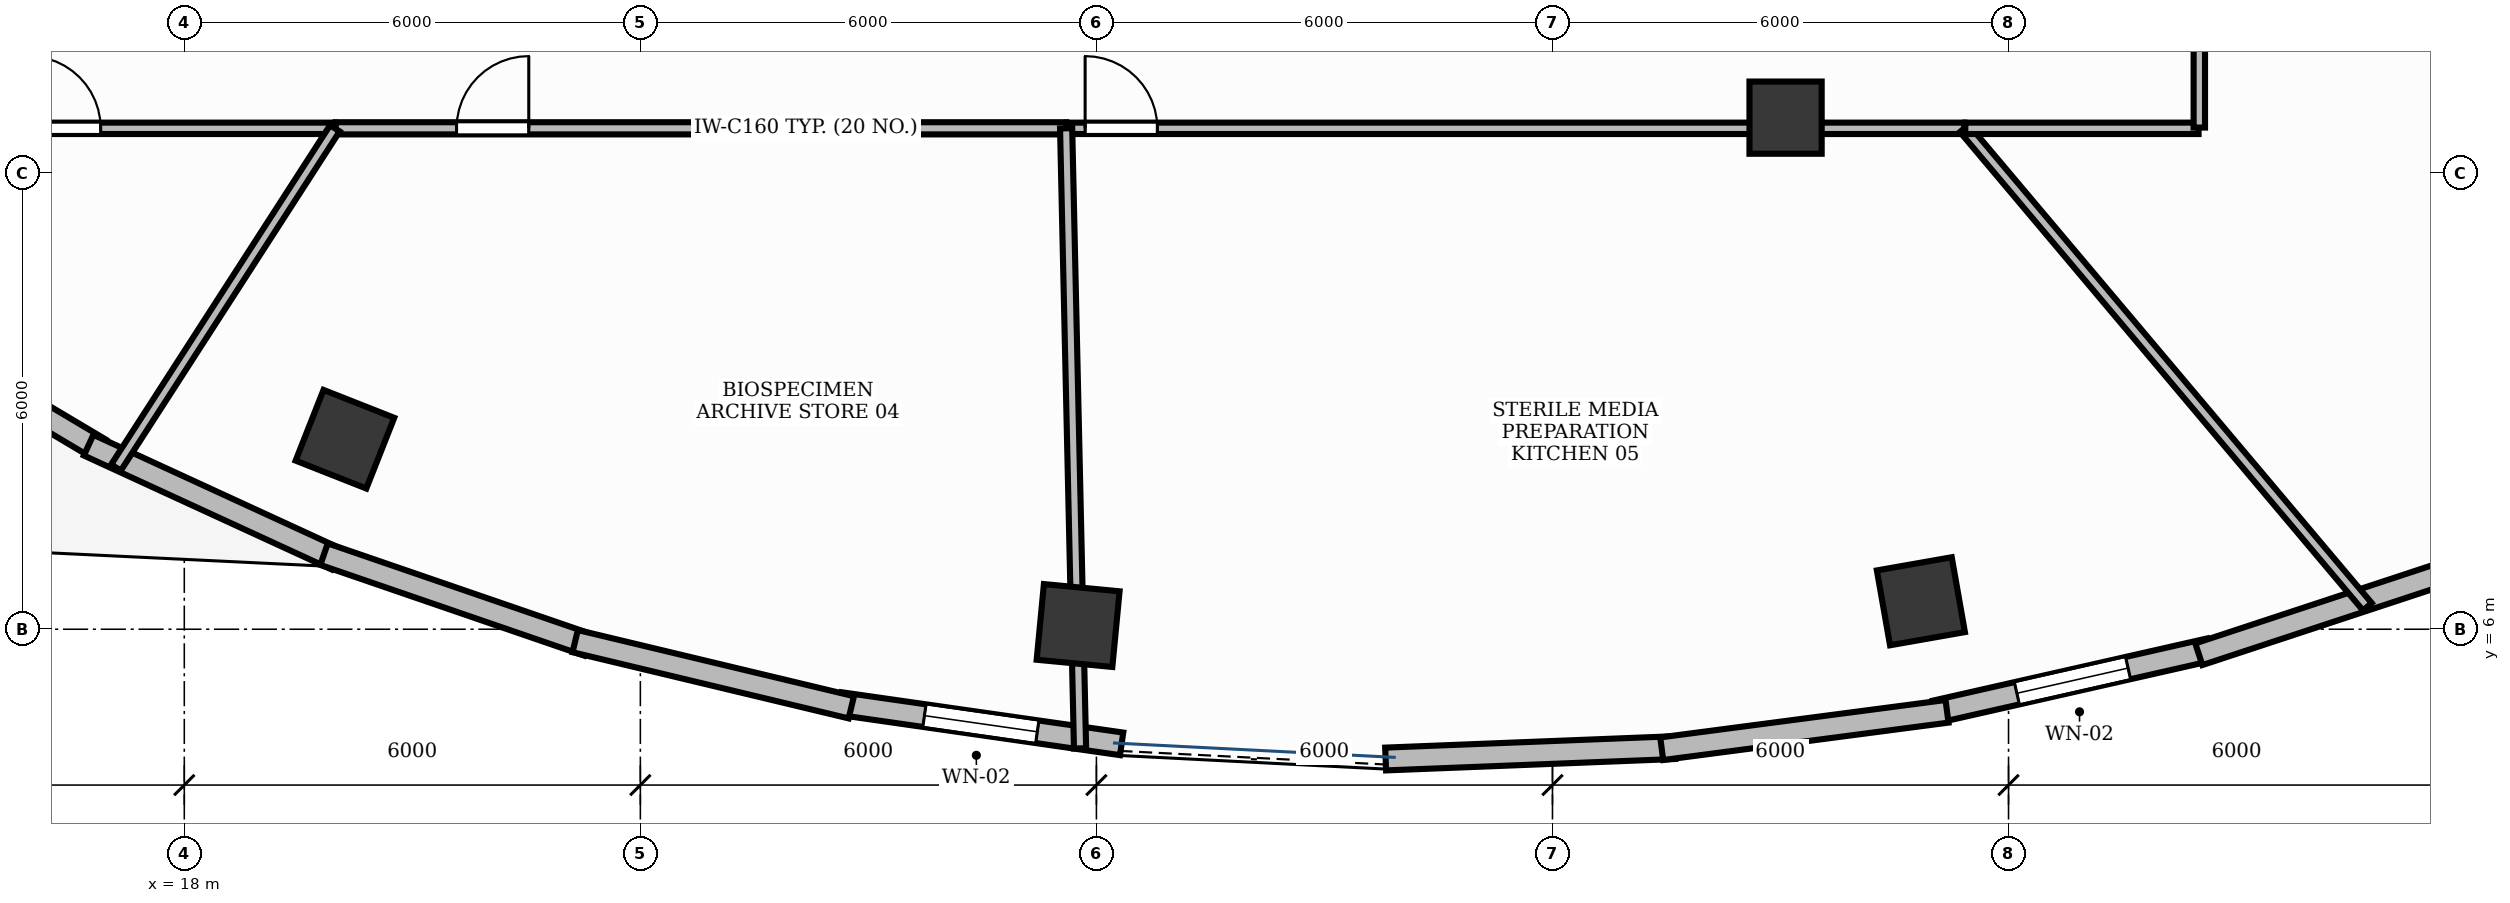
"""IFC4 building model, lengths in metres.
Left out: names, types, materials, properties, quantities, classifications, styles, units other than length and angle.
Written with IfcOpenShell. Run it as: python <this file> out.ifc"""

import sys

from ifc_helpers import new_model, si_unit, direction, frame, frame_2d, origin, origin_2d, place, context, subcontext, project, spatial, rectangle, extrude, element, fill, save


model = new_model("IFC4")
c1 = context("Model", 3, precision=1e-05, world=origin(), true_north=direction((0.0, 1.0)))
c2 = subcontext(c1, "Body", "Model", "MODEL_VIEW")
j1 = project(units=[si_unit("LENGTHUNIT", "METRE"), si_unit("PLANEANGLEUNIT", "RADIAN")], contexts=[c1])
p1 = place(None, origin())
s1 = spatial("IfcSite", under=j1, at=p1, CompositionType="ELEMENT")
p2 = place(p1, origin())
s2 = spatial("IfcBuilding", under=s1, at=p2, CompositionType="ELEMENT")
p3 = place(p2, frame((0.0, 0.0, 222.6)))
s3 = spatial("IfcBuildingStorey", under=s2, at=p3, CompositionType="ELEMENT", Elevation=222.6)
for number, where, z_axis, x_axis in (
    (1, (20.113, 8.5, -0.0), (0.0, 0.0, 1.0), (-0.93, 0.367, 0.0)),
    (2, (29.759, 6.049, -0.0), (0.0, 0.0, 1.0), (-0.995, 0.095, 0.0)),
    (3, (40.847, 6.368, -0.0), (0.0, 0.0, 1.0), (0.985, 0.173, 0.0)),
):
    element("IfcColumn", number, at=place(p3, frame(where, z_axis=z_axis, x_axis=x_axis)), inside=s3, PredefinedType="COLUMN", context=c2, shape_type="SweptSolid", body=[
        extrude(rectangle(XDim=1.0, YDim=1.0, at=origin_2d()), origin(), (0.0, 0.0, 1.0), 3.901),
    ])
p4 = place(p3, frame((39.067, 12.73, -0.0), z_axis=(0.0, 0.0, 1.0), x_axis=(1.0, 0.0, 0.0)))
e4 = element("IfcColumn", 4, at=p4, inside=s3, PredefinedType="COLUMN", context=c2, shape_type="SweptSolid", body=[
    extrude(rectangle(XDim=0.95, YDim=0.95, at=origin_2d()), origin(), (0.0, 0.0, 1.0), 3.901),
])
p5 = place(p3, frame((13.923, 10.132, 0.0), z_axis=(0.0, 0.0, 1.0), x_axis=(0.859459434124, -0.511203952543, 0.0)))
e5 = element("IfcWall", 5, at=p5, inside=s3, PredefinedType="STANDARD", context=c2, shape_type="SweptSolid", body=[
    extrude(rectangle(XDim=3.45, YDim=0.3, at=frame_2d((1.725, 0.0))), origin(), (0.0, 0.0, 1.0), 3.9),
])
p6 = place(p5, frame((0.975, 0.0, 0.95)))
e6 = element("IfcOpeningElement", 6, at=p6, cuts=e5, PredefinedType="OPENING", context=c2, shape_type="SweptSolid", body=[
    extrude(rectangle(XDim=1.5, YDim=1.8, at=frame_2d((0.75, 0.9))), frame((0.0, 0.165, 0.0), z_axis=(0.0, -1.0, 0.0), x_axis=(1.0, 0.0, 0.0)), (0.0, 0.0, 1.0), 0.33),
])
p7 = place(p3, frame((26.628, 5.022, 0.0), z_axis=(0.0, 0.0, 1.0), x_axis=(0.989905072127, -0.14173195891, 0.0)))
e7 = element("IfcWall", 7, at=p7, inside=s3, PredefinedType="STANDARD", context=c2, shape_type="SweptSolid", body=[
    extrude(rectangle(XDim=3.741, YDim=0.3, at=frame_2d((1.871, 0.0))), origin(), (0.0, 0.0, 1.0), 3.47),
])
p8 = place(p7, frame((1.121, 0.0, 0.95)))
e8 = element("IfcOpeningElement", 8, at=p8, cuts=e7, PredefinedType="OPENING", context=c2, shape_type="SweptSolid", body=[
    extrude(rectangle(XDim=1.5, YDim=1.8, at=frame_2d((0.75, 0.9))), frame((0.0, 0.165, 0.0), z_axis=(0.0, -1.0, 0.0), x_axis=(1.0, 0.0, 0.0)), (0.0, 0.0, 1.0), 0.33),
])
p9 = place(p3, frame((41.036, 4.914, 0.0), z_axis=(0.0, 0.0, 1.0), x_axis=(0.975237678872, 0.221159376263, 0.0)))
e9 = element("IfcWall", 9, at=p9, inside=s3, PredefinedType="STANDARD", context=c2, shape_type="SweptSolid", body=[
    extrude(rectangle(XDim=3.703, YDim=0.3, at=frame_2d((1.851, 0.0))), origin(), (0.0, 0.0, 1.0), 3.9),
])
p10 = place(p9, frame((1.101, 0.0, 0.95)))
e10 = element("IfcOpeningElement", 10, at=p10, cuts=e9, PredefinedType="OPENING", context=c2, shape_type="SweptSolid", body=[
    extrude(rectangle(XDim=1.5, YDim=1.8, at=frame_2d((0.75, 0.9))), frame((0.0, 0.165, 0.0), z_axis=(0.0, -1.0, 0.0), x_axis=(1.0, 0.0, 0.0)), (0.0, 0.0, 1.0), 0.33),
])
p11 = place(p3, frame((16.741, 8.422, 0.0), z_axis=(0.0, 0.0, 1.0), x_axis=(0.908506474671, -0.417870776055, 0.0)))
e11 = element("IfcWall", 11, at=p11, inside=s3, PredefinedType="STANDARD", context=c2, shape_type="SweptSolid", body=[
    extrude(rectangle(XDim=3.587, YDim=0.3, at=frame_2d((1.793, 0.0))), origin(), (0.0, 0.0, 1.0), 3.9),
])
p12 = place(p3, frame((19.838, 6.988, 0.0), z_axis=(0.0, 0.0, 1.0), x_axis=(0.945722383555, -0.32497565023, 0.0)))
e12 = element("IfcWall", 12, at=p12, inside=s3, PredefinedType="STANDARD", context=c2, shape_type="SweptSolid", body=[
    extrude(rectangle(XDim=3.67, YDim=0.3, at=frame_2d((1.835, 0.0))), origin(), (0.0, 0.0, 1.0), 3.47),
])
p13 = place(p3, frame((23.143, 5.843, 0.0), z_axis=(0.0, 0.0, 1.0), x_axis=(0.972475629939, -0.233004611918, 0.0)))
e13 = element("IfcWall", 13, at=p13, inside=s3, PredefinedType="STANDARD", context=c2, shape_type="SweptSolid", body=[
    extrude(rectangle(XDim=3.735, YDim=0.3, at=frame_2d((1.868, 0.0))), origin(), (0.0, 0.0, 1.0), 3.9),
])
p14 = place(p3, frame((33.805, 4.292, 0.0), z_axis=(0.0, 0.0, 1.0), x_axis=(0.999221923177, 0.039440439173, 0.0)))
e14 = element("IfcWall", 14, at=p14, inside=s3, PredefinedType="STANDARD", context=c2, shape_type="SweptSolid", body=[
    extrude(rectangle(XDim=3.807, YDim=0.3, at=frame_2d((1.903, 0.0))), origin(), (0.0, 0.0, 1.0), 3.9),
])
p15 = place(p3, frame((37.437, 4.428, 0.0), z_axis=(0.0, 0.0, 1.0), x_axis=(0.991512801574, 0.130009093201, 0.0)))
e15 = element("IfcWall", 15, at=p15, inside=s3, PredefinedType="STANDARD", context=c2, shape_type="SweptSolid", body=[
    extrude(rectangle(XDim=3.786, YDim=0.3, at=frame_2d((1.893, 0.0))), origin(), (0.0, 0.0, 1.0), 3.9),
])
p16 = place(p3, frame((44.504, 5.671, 0.0), z_axis=(0.0, 0.0, 1.0), x_axis=(0.94972655205, 0.313080622734, 0.0)))
e16 = element("IfcWall", 16, at=p16, inside=s3, PredefinedType="STANDARD", context=c2, shape_type="SweptSolid", body=[
    extrude(rectangle(XDim=3.679, YDim=0.3, at=frame_2d((1.84, 0.0))), origin(), (0.0, 0.0, 1.0), 3.9),
])
p17 = place(p3, frame((14.454, 12.59, 0.0), z_axis=(0.0, 0.0, 1.0), x_axis=(1.0, 0.0, 0.0)))
e17 = element("IfcWall", 17, at=p17, inside=s3, PredefinedType="PARTITIONING", context=c2, shape_type="SweptSolid", body=[
    extrude(rectangle(XDim=5.527, YDim=0.15, at=frame_2d((2.763, 0.0))), origin(), (0.0, 0.0, 1.0), 2.91),
])
p18 = place(p17, frame((1.496, 0.0, 0.0)))
e18 = element("IfcOpeningElement", 18, at=p18, cuts=e17, PredefinedType="OPENING", context=c2, shape_type="SweptSolid", body=[
    extrude(rectangle(XDim=0.95, YDim=2.15, at=frame_2d((0.475, 1.075))), frame((0.0, 0.09, 0.0), z_axis=(0.0, -1.0, 0.0), x_axis=(1.0, 0.0, 0.0)), (0.0, 0.0, 1.0), 0.18),
])
p19 = place(p3, frame((19.991, 12.59, 0.0), z_axis=(0.0, 0.0, 1.0), x_axis=(1.0, 0.0, 0.0)))
e19 = element("IfcWall", 19, at=p19, inside=s3, PredefinedType="PARTITIONING", context=c2, shape_type="SweptSolid", body=[
    extrude(rectangle(XDim=9.611, YDim=0.16, at=frame_2d((4.805, 0.0))), origin(), (0.0, 0.0, 1.0), 2.91),
])
p20 = place(p19, frame((1.591, 0.0, 0.0)))
e20 = element("IfcOpeningElement", 20, at=p20, cuts=e19, PredefinedType="OPENING", context=c2, shape_type="SweptSolid", body=[
    extrude(rectangle(XDim=0.95, YDim=2.15, at=frame_2d((0.475, 1.075))), frame((0.0, 0.095, 0.0), z_axis=(0.0, -1.0, 0.0), x_axis=(1.0, 0.0, 0.0)), (0.0, 0.0, 1.0), 0.19),
])
p21 = place(p3, frame((29.612, 12.59, 0.0), z_axis=(0.0, 0.0, 1.0), x_axis=(1.0, 0.0, 0.0)))
e21 = element("IfcWall", 21, at=p21, inside=s3, PredefinedType="PARTITIONING", context=c2, shape_type="SweptSolid", body=[
    extrude(rectangle(XDim=11.806, YDim=0.15, at=frame_2d((5.903, 0.0))), origin(), (0.0, 0.0, 1.0), 2.91),
])
p22 = place(p21, frame((0.24, 0.0, 0.0)))
e22 = element("IfcOpeningElement", 22, at=p22, cuts=e21, PredefinedType="OPENING", context=c2, shape_type="SweptSolid", body=[
    extrude(rectangle(XDim=0.95, YDim=2.15, at=frame_2d((0.475, 1.075))), frame((0.0, 0.09, 0.0), z_axis=(0.0, -1.0, 0.0), x_axis=(1.0, 0.0, 0.0)), (0.0, 0.0, 1.0), 0.18),
])
p23 = place(p3, frame((19.981, 12.59, 0.0), z_axis=(0.0, 0.0, 1.0), x_axis=(-0.542120587928, -0.840300701026, 0.0)))
e23 = element("IfcWall", 23, at=p23, inside=s3, PredefinedType="PARTITIONING", context=c2, shape_type="SweptSolid", body=[
    extrude(rectangle(XDim=5.311, YDim=0.15, at=frame_2d((2.656, 0.0))), origin(), (0.0, 0.0, 1.0), 2.91),
])
p24 = place(p3, frame((29.602, 12.59, 0.0), z_axis=(0.0, 0.0, 1.0), x_axis=(0.02244070068, -0.999748175769, 0.0)))
e24 = element("IfcWall", 24, at=p24, inside=s3, PredefinedType="PARTITIONING", context=c2, shape_type="SweptSolid", body=[
    extrude(rectangle(XDim=8.159, YDim=0.16, at=frame_2d((4.08, 0.0))), origin(), (0.0, 0.0, 1.0), 2.91),
])
p25 = place(p3, frame((41.418, 12.59, 0.0), z_axis=(0.0, 0.0, 1.0), x_axis=(0.644315695233, -0.764759625554, 0.0)))
e25 = element("IfcWall", 25, at=p25, inside=s3, PredefinedType="PARTITIONING", context=c2, shape_type="SweptSolid", body=[
    extrude(rectangle(XDim=8.23, YDim=0.15, at=frame_2d((4.115, 0.0))), origin(), (0.0, 0.0, 1.0), 2.91),
])
p26 = place(p3, frame((41.431, 12.59, 0.0), z_axis=(0.0, 0.0, 1.0), x_axis=(1.0, 0.0, 0.0)))
e26 = element("IfcWall", 26, at=p26, inside=s3, PredefinedType="PARTITIONING", context=c2, shape_type="SweptSolid", body=[
    extrude(rectangle(XDim=3.069, YDim=0.15, at=frame_2d((1.535, 0.0))), origin(), (0.0, 0.0, 1.0), 2.91),
])
p27 = place(p3, frame((44.51, 12.6, 0.0), z_axis=(0.0, 0.0, 1.0), x_axis=(0.0, 1.0, 0.0)))
e27 = element("IfcWall", 27, at=p27, inside=s3, PredefinedType="PARTITIONING", context=c2, shape_type="SweptSolid", body=[
    extrude(rectangle(XDim=3.8, YDim=0.15, at=frame_2d((1.9, 0.0))), origin(), (0.0, 0.0, 1.0), 2.91),
])
p28 = place(p8, origin())
e28 = element("IfcWindow", 28, at=p28, inside=s3, PartitioningType="DOUBLE_PANEL_VERTICAL", PredefinedType="WINDOW", context=c2, shape_type="SweptSolid", body=[
    extrude(rectangle(XDim=1.5, YDim=1.8, at=frame_2d((0.75, 0.9))), frame((0.0, 0.03, 0.0), z_axis=(0.0, -1.0, 0.0), x_axis=(1.0, 0.0, 0.0)), (0.0, 0.0, 1.0), 0.06),
])
fill(e8, e28)
p29 = place(p10, origin())
e29 = element("IfcWindow", 29, at=p29, inside=s3, PartitioningType="DOUBLE_PANEL_VERTICAL", PredefinedType="WINDOW", context=c2, shape_type="SweptSolid", body=[
    extrude(rectangle(XDim=1.5, YDim=1.8, at=frame_2d((0.75, 0.9))), frame((0.0, 0.03, 0.0), z_axis=(0.0, -1.0, 0.0), x_axis=(1.0, 0.0, 0.0)), (0.0, 0.0, 1.0), 0.06),
])
fill(e10, e29)
p30 = place(p18, origin())
e30 = element("IfcDoor", 30, at=p30, inside=s3, OperationType="SINGLE_SWING_LEFT", PredefinedType="DOOR", context=c2, shape_type="SweptSolid", body=[
    extrude(rectangle(XDim=0.95, YDim=2.15, at=frame_2d((0.475, 1.075))), frame((0.0, 0.025, 0.0), z_axis=(0.0, -1.0, 0.0), x_axis=(1.0, 0.0, 0.0)), (0.0, 0.0, 1.0), 0.05),
])
fill(e18, e30)
p31 = place(p20, origin())
e31 = element("IfcDoor", 31, at=p31, inside=s3, OperationType="SINGLE_SWING_RIGHT", PredefinedType="DOOR", context=c2, shape_type="SweptSolid", body=[
    extrude(rectangle(XDim=0.95, YDim=2.15, at=frame_2d((0.475, 1.075))), frame((0.0, 0.025, 0.0), z_axis=(0.0, -1.0, 0.0), x_axis=(1.0, 0.0, 0.0)), (0.0, 0.0, 1.0), 0.05),
])
fill(e20, e31)
p32 = place(p22, origin())
e32 = element("IfcDoor", 32, at=p32, inside=s3, OperationType="SINGLE_SWING_LEFT", PredefinedType="DOOR", context=c2, shape_type="SweptSolid", body=[
    extrude(rectangle(XDim=0.95, YDim=2.15, at=frame_2d((0.475, 1.075))), frame((0.0, 0.025, 0.0), z_axis=(0.0, -1.0, 0.0), x_axis=(1.0, 0.0, 0.0)), (0.0, 0.0, 1.0), 0.05),
])
fill(e22, e32)
save(model, sys.argv[1])
